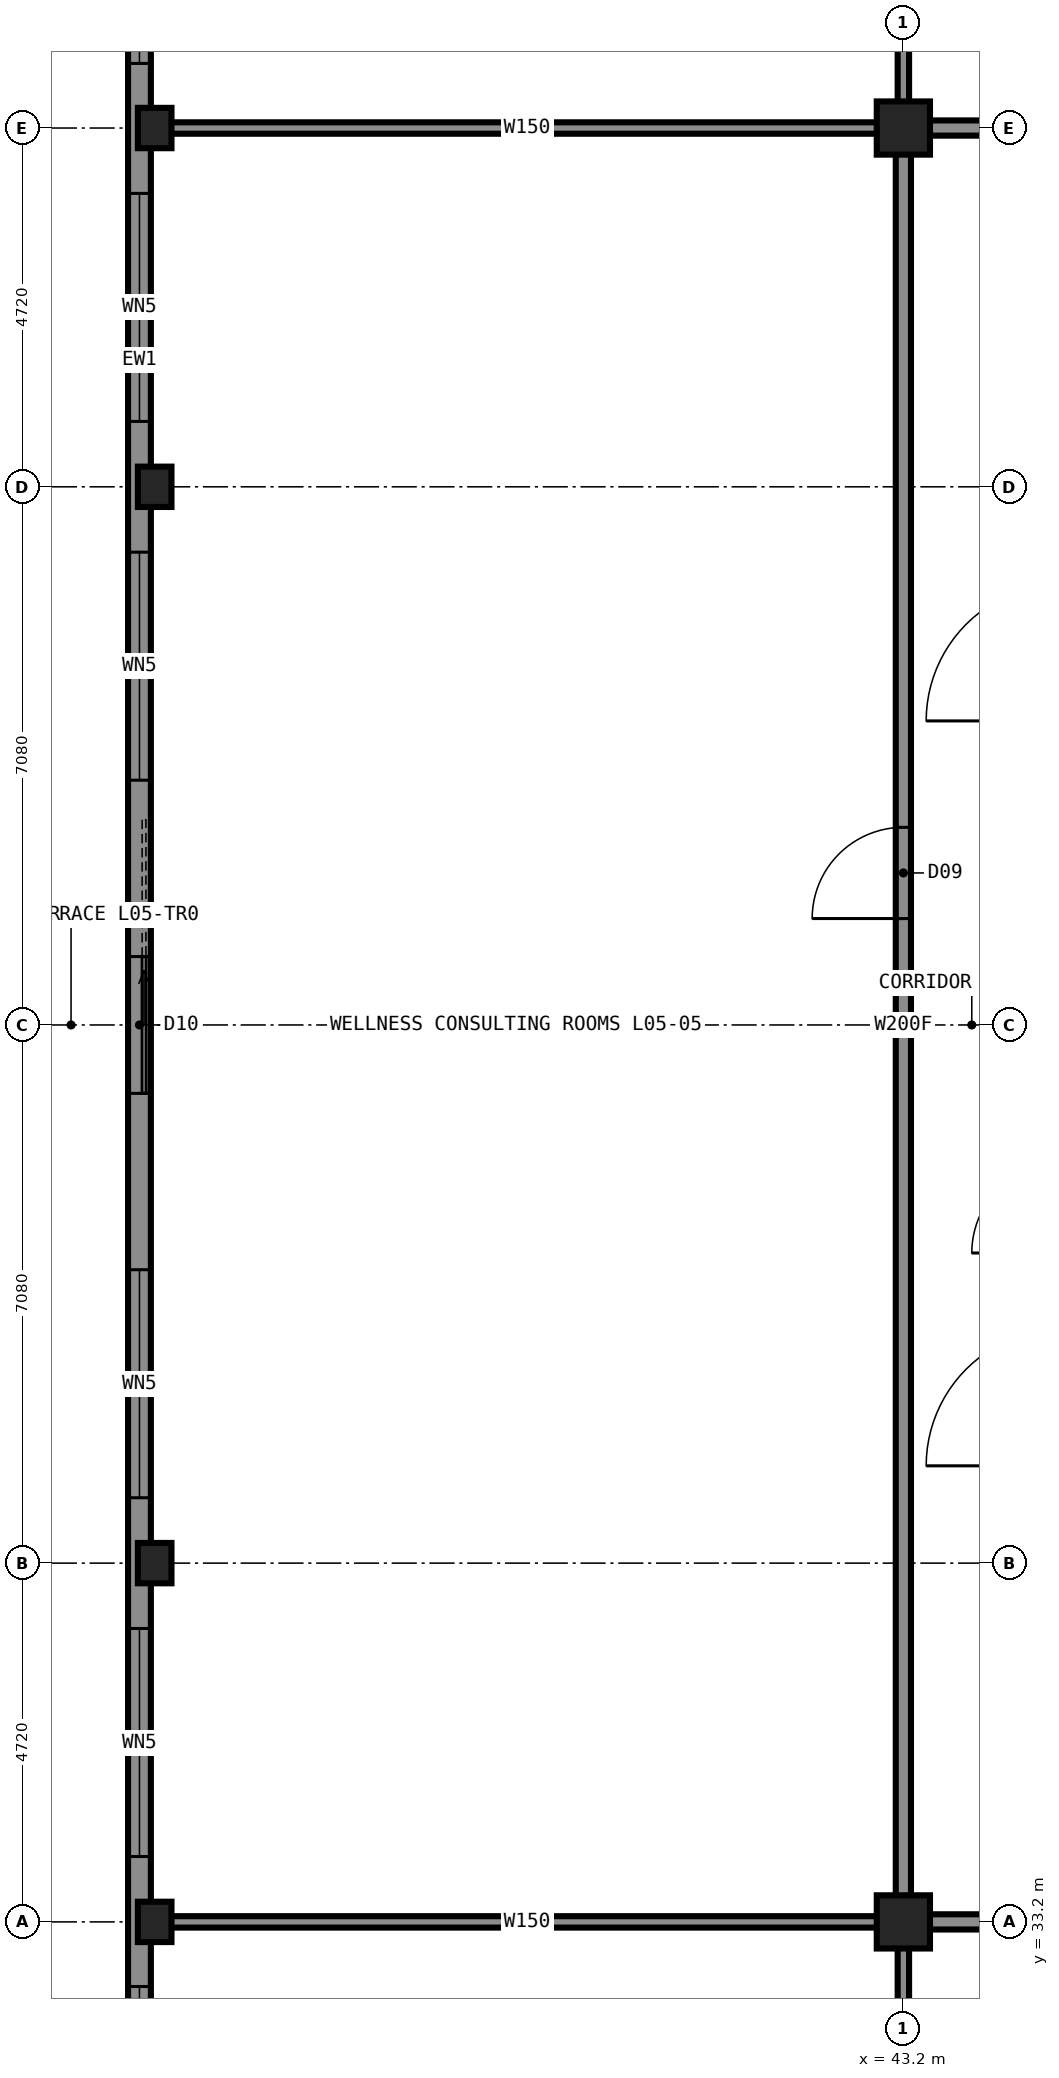
"""IFC4 building model, lengths in metres.
Left out: names, types, materials, properties, quantities, classifications, styles, units other than length and angle.
Written with IfcOpenShell. Run it as: python <this file> out.ifc"""

import sys

from ifc_helpers import new_model, si_unit, direction, frame, frame_2d, origin, origin_2d, place, context, subcontext, project, spatial, rectangle, hollow_rectangle, i_section, extrude, element, fill, save


model = new_model("IFC4")
c1 = context("Model", 3, precision=1e-05, world=origin(), true_north=direction((0.0, 1.0)))
c2 = subcontext(c1, "Body", "Model", "MODEL_VIEW")
j1 = project(units=[si_unit("LENGTHUNIT", "METRE"), si_unit("PLANEANGLEUNIT", "RADIAN")], contexts=[c1])
p1 = place(None, origin())
s1 = spatial("IfcSite", under=j1, at=p1, CompositionType="ELEMENT")
p2 = place(p1, origin())
s2 = spatial("IfcBuilding", under=s1, at=p2, CompositionType="ELEMENT")
p3 = place(p2, frame((0.0, 0.0, 25.0)))
s3 = spatial("IfcBuildingStorey", under=s2, at=p3, CompositionType="ELEMENT", Elevation=25.0)
for number, where, z_axis, x_axis in (
    (1, (33.35, 33.2, 0.0), (0.0, 0.0, 1.0), (1.0, 0.0, 0.0)),
    (2, (33.35, 37.92, 0.0), (0.0, 0.0, 1.0), (1.0, 0.0, 0.0)),
    (3, (33.35, 52.08, 0.0), (0.0, 0.0, 1.0), (1.0, 0.0, 0.0)),
    (4, (33.35, 56.8, 0.0), (0.0, 0.0, 1.0), (1.0, 0.0, 0.0)),
):
    element("IfcColumn", number, at=place(p3, frame(where, z_axis=z_axis, x_axis=x_axis)), inside=s3, PredefinedType="COLUMN", context=c2, shape_type="SweptSolid", body=[
        extrude(i_section(OverallWidth=0.442, OverallDepth=0.531, WebThickness=0.066, FlangeThickness=0.106, at=origin_2d()), origin(), (0.0, 0.0, 1.0), 3.5),
    ])
for number, where, z_axis, x_axis in (
    (5, (43.2, 33.2, 0.0), (0.0, 0.0, 1.0), (1.0, 0.0, 0.0)),
    (6, (43.2, 56.8, 0.0), (0.0, 0.0, 1.0), (1.0, 0.0, 0.0)),
):
    element("IfcColumn", number, at=place(p3, frame(where, z_axis=z_axis, x_axis=x_axis)), inside=s3, PredefinedType="COLUMN", context=c2, shape_type="SweptSolid", body=[
        extrude(hollow_rectangle(XDim=0.7, YDim=0.7, WallThickness=0.06, at=origin_2d()), origin(), (0.0, 0.0, 1.0), 3.5),
    ])
p4 = place(p3, frame((43.2, 33.2, 0.0), z_axis=(0.0, 0.0, 1.0), x_axis=(1.0, 0.0, 0.0)))
e7 = element("IfcWall", 7, at=p4, inside=s3, PredefinedType="PARTITIONING", context=c2, shape_type="SweptSolid", body=[
    extrude(rectangle(XDim=23.6, YDim=0.2, at=frame_2d((11.8, 0.0))), origin(), (0.0, 0.0, 1.0), 3.33),
])
p5 = place(p4, frame((4.9, 0.0, 0.0)))
e8 = element("IfcOpeningElement", 8, at=p5, cuts=e7, PredefinedType="OPENING", context=c2, shape_type="SweptSolid", body=[
    extrude(rectangle(XDim=1.8, YDim=2.2, at=frame_2d((0.9, 1.1))), frame((0.0, 0.11, 0.0), z_axis=(0.0, -1.0, 0.0), x_axis=(1.0, 0.0, 0.0)), (0.0, 0.0, 1.0), 0.22),
])
p6 = place(p3, frame((33.3, 33.2, 0.0), z_axis=(0.0, 0.0, 1.0), x_axis=(1.0, 0.0, 0.0)))
e9 = element("IfcWall", 9, at=p6, inside=s3, PredefinedType="PARTITIONING", context=c2, shape_type="SweptSolid", body=[
    extrude(rectangle(XDim=9.9, YDim=0.15, at=frame_2d((4.95, 0.0))), origin(), (0.0, 0.0, 1.0), 2.573),
])
p7 = place(p3, frame((43.2, 56.8, 0.0), z_axis=(0.0, 0.0, 1.0), x_axis=(1.0, 0.0, 0.0)))
e10 = element("IfcWall", 10, at=p7, inside=s3, PredefinedType="PARTITIONING", context=c2, shape_type="SweptSolid", body=[
    extrude(rectangle(XDim=23.6, YDim=0.2, at=frame_2d((11.8, 0.0))), origin(), (0.0, 0.0, 1.0), 3.33),
])
p8 = place(p7, frame((4.9, 0.0, 0.0)))
e11 = element("IfcOpeningElement", 11, at=p8, cuts=e10, PredefinedType="OPENING", context=c2, shape_type="SweptSolid", body=[
    extrude(rectangle(XDim=1.8, YDim=2.2, at=frame_2d((0.9, 1.1))), frame((0.0, 0.11, 0.0), z_axis=(0.0, -1.0, 0.0), x_axis=(1.0, 0.0, 0.0)), (0.0, 0.0, 1.0), 0.22),
])
p9 = place(p3, frame((33.3, 56.8, 0.0), z_axis=(0.0, 0.0, 1.0), x_axis=(1.0, 0.0, 0.0)))
e12 = element("IfcWall", 12, at=p9, inside=s3, PredefinedType="PARTITIONING", context=c2, shape_type="SweptSolid", body=[
    extrude(rectangle(XDim=9.9, YDim=0.15, at=frame_2d((4.95, 0.0))), origin(), (0.0, 0.0, 1.0), 2.573),
])
p10 = place(p3, frame((43.2, 33.2, 0.0), z_axis=(0.0, 0.0, 1.0), x_axis=(0.0, 1.0, 0.0)))
e13 = element("IfcWall", 13, at=p10, inside=s3, PredefinedType="PARTITIONING", context=c2, shape_type="SweptSolid", body=[
    extrude(rectangle(XDim=23.6, YDim=0.2, at=frame_2d((11.8, 0.0))), origin(), (0.0, 0.0, 1.0), 3.33),
])
p11 = place(p10, frame((13.2, 0.0, 0.0)))
e14 = element("IfcOpeningElement", 14, at=p11, cuts=e13, PredefinedType="OPENING", context=c2, shape_type="SweptSolid", body=[
    extrude(rectangle(XDim=1.2, YDim=2.2, at=frame_2d((0.6, 1.1))), frame((0.0, 0.11, 0.0), z_axis=(0.0, -1.0, 0.0), x_axis=(1.0, 0.0, 0.0)), (0.0, 0.0, 1.0), 0.22),
])
p12 = place(p3, frame((43.2, 23.3, 0.0), z_axis=(0.0, 0.0, 1.0), x_axis=(0.0, 1.0, 0.0)))
e15 = element("IfcWall", 15, at=p12, inside=s3, PredefinedType="PARTITIONING", context=c2, shape_type="SweptSolid", body=[
    extrude(rectangle(XDim=9.9, YDim=0.15, at=frame_2d((4.95, 0.0))), origin(), (0.0, 0.0, 1.0), 2.573),
])
p13 = place(p12, frame((5.1, 0.0, 0.0)))
e16 = element("IfcOpeningElement", 16, at=p13, cuts=e15, PredefinedType="OPENING", context=c2, shape_type="SweptSolid", body=[
    extrude(rectangle(XDim=1.2, YDim=2.2, at=frame_2d((0.6, 1.1))), frame((0.0, 0.085, 0.0), z_axis=(0.0, -1.0, 0.0), x_axis=(1.0, 0.0, 0.0)), (0.0, 0.0, 1.0), 0.17),
])
p14 = place(p3, frame((43.2, 56.8, 0.0), z_axis=(0.0, 0.0, 1.0), x_axis=(0.0, 1.0, 0.0)))
e17 = element("IfcWall", 17, at=p14, inside=s3, PredefinedType="PARTITIONING", context=c2, shape_type="SweptSolid", body=[
    extrude(rectangle(XDim=9.9, YDim=0.15, at=frame_2d((4.95, 0.0))), origin(), (0.0, 0.0, 1.0), 2.573),
])
p15 = place(p14, frame((3.6, 0.0, 0.0)))
e18 = element("IfcOpeningElement", 18, at=p15, cuts=e17, PredefinedType="OPENING", context=c2, shape_type="SweptSolid", body=[
    extrude(rectangle(XDim=1.2, YDim=2.2, at=frame_2d((0.6, 1.1))), frame((0.0, 0.085, 0.0), z_axis=(0.0, -1.0, 0.0), x_axis=(1.0, 0.0, 0.0)), (0.0, 0.0, 1.0), 0.17),
])
p16 = place(p3, frame((33.15, 61.5, 0.0), z_axis=(0.0, 0.0, 1.0), x_axis=(0.0, -1.0, 0.0)))
e19 = element("IfcWall", 19, at=p16, inside=s3, PredefinedType="SOLIDWALL", context=c2, shape_type="SweptSolid", body=[
    extrude(rectangle(XDim=33.0, YDim=0.3, at=frame_2d((16.5, 0.0))), origin(), (0.0, 0.0, 1.0), 2.83),
])
p17 = place(p16, frame((0.85, 0.0, 0.3)))
e20 = element("IfcOpeningElement", 20, at=p17, cuts=e19, PredefinedType="OPENING", context=c2, shape_type="SweptSolid", body=[
    extrude(rectangle(XDim=3.0, YDim=2.5, at=frame_2d((1.5, 1.25))), frame((0.0, 0.16, 0.0), z_axis=(0.0, -1.0, 0.0), x_axis=(1.0, 0.0, 0.0)), (0.0, 0.0, 1.0), 0.32),
])
p18 = place(p16, frame((5.56, 0.0, 0.3)))
e21 = element("IfcOpeningElement", 21, at=p18, cuts=e19, PredefinedType="OPENING", context=c2, shape_type="SweptSolid", body=[
    extrude(rectangle(XDim=3.0, YDim=2.5, at=frame_2d((1.5, 1.25))), frame((0.0, 0.16, 0.0), z_axis=(0.0, -1.0, 0.0), x_axis=(1.0, 0.0, 0.0)), (0.0, 0.0, 1.0), 0.32),
])
p19 = place(p16, frame((10.28, 0.0, 0.3)))
e22 = element("IfcOpeningElement", 22, at=p19, cuts=e19, PredefinedType="OPENING", context=c2, shape_type="SweptSolid", body=[
    extrude(rectangle(XDim=3.0, YDim=2.5, at=frame_2d((1.5, 1.25))), frame((0.0, 0.16, 0.0), z_axis=(0.0, -1.0, 0.0), x_axis=(1.0, 0.0, 0.0)), (0.0, 0.0, 1.0), 0.32),
])
p20 = place(p16, frame((15.6, 0.0, 0.0)))
e23 = element("IfcOpeningElement", 23, at=p20, cuts=e19, PredefinedType="OPENING", context=c2, shape_type="SweptSolid", body=[
    extrude(rectangle(XDim=1.8, YDim=2.4, at=frame_2d((0.9, 1.2))), frame((0.0, 0.16, 0.0), z_axis=(0.0, -1.0, 0.0), x_axis=(1.0, 0.0, 0.0)), (0.0, 0.0, 1.0), 0.32),
])
p21 = place(p16, frame((19.72, 0.0, 0.3)))
e24 = element("IfcOpeningElement", 24, at=p21, cuts=e19, PredefinedType="OPENING", context=c2, shape_type="SweptSolid", body=[
    extrude(rectangle(XDim=3.0, YDim=2.5, at=frame_2d((1.5, 1.25))), frame((0.0, 0.16, 0.0), z_axis=(0.0, -1.0, 0.0), x_axis=(1.0, 0.0, 0.0)), (0.0, 0.0, 1.0), 0.32),
])
p22 = place(p16, frame((24.44, 0.0, 0.3)))
e25 = element("IfcOpeningElement", 25, at=p22, cuts=e19, PredefinedType="OPENING", context=c2, shape_type="SweptSolid", body=[
    extrude(rectangle(XDim=3.0, YDim=2.5, at=frame_2d((1.5, 1.25))), frame((0.0, 0.16, 0.0), z_axis=(0.0, -1.0, 0.0), x_axis=(1.0, 0.0, 0.0)), (0.0, 0.0, 1.0), 0.32),
])
p23 = place(p16, frame((29.15, 0.0, 0.3)))
e26 = element("IfcOpeningElement", 26, at=p23, cuts=e19, PredefinedType="OPENING", context=c2, shape_type="SweptSolid", body=[
    extrude(rectangle(XDim=3.0, YDim=2.5, at=frame_2d((1.5, 1.25))), frame((0.0, 0.16, 0.0), z_axis=(0.0, -1.0, 0.0), x_axis=(1.0, 0.0, 0.0)), (0.0, 0.0, 1.0), 0.32),
])
p24 = place(p11, origin())
e27 = element("IfcDoor", 27, at=p24, inside=s3, OperationType="SINGLE_SWING_LEFT", PredefinedType="DOOR", context=c2, shape_type="SweptSolid", body=[
    extrude(rectangle(XDim=1.2, YDim=2.2, at=frame_2d((0.6, 1.1))), frame((0.0, 0.025, 0.0), z_axis=(0.0, -1.0, 0.0), x_axis=(1.0, 0.0, 0.0)), (0.0, 0.0, 1.0), 0.05),
])
fill(e14, e27)
p25 = place(p17, origin())
e28 = element("IfcWindow", 28, at=p25, inside=s3, PartitioningType="SINGLE_PANEL", PredefinedType="WINDOW", context=c2, shape_type="SweptSolid", body=[
    extrude(rectangle(XDim=3.0, YDim=2.5, at=frame_2d((1.5, 1.25))), frame((0.0, 0.03, 0.0), z_axis=(0.0, -1.0, 0.0), x_axis=(1.0, 0.0, 0.0)), (0.0, 0.0, 1.0), 0.06),
])
fill(e20, e28)
p26 = place(p18, origin())
e29 = element("IfcWindow", 29, at=p26, inside=s3, PartitioningType="SINGLE_PANEL", PredefinedType="WINDOW", context=c2, shape_type="SweptSolid", body=[
    extrude(rectangle(XDim=3.0, YDim=2.5, at=frame_2d((1.5, 1.25))), frame((0.0, 0.03, 0.0), z_axis=(0.0, -1.0, 0.0), x_axis=(1.0, 0.0, 0.0)), (0.0, 0.0, 1.0), 0.06),
])
fill(e21, e29)
p27 = place(p19, origin())
e30 = element("IfcWindow", 30, at=p27, inside=s3, PartitioningType="SINGLE_PANEL", PredefinedType="WINDOW", context=c2, shape_type="SweptSolid", body=[
    extrude(rectangle(XDim=3.0, YDim=2.5, at=frame_2d((1.5, 1.25))), frame((0.0, 0.03, 0.0), z_axis=(0.0, -1.0, 0.0), x_axis=(1.0, 0.0, 0.0)), (0.0, 0.0, 1.0), 0.06),
])
fill(e22, e30)
p28 = place(p20, origin())
e31 = element("IfcDoor", 31, at=p28, inside=s3, OperationType="SLIDING_TO_LEFT", PredefinedType="DOOR", context=c2, shape_type="SweptSolid", body=[
    extrude(rectangle(XDim=1.8, YDim=2.4, at=frame_2d((0.9, 1.2))), frame((0.0, 0.025, 0.0), z_axis=(0.0, -1.0, 0.0), x_axis=(1.0, 0.0, 0.0)), (0.0, 0.0, 1.0), 0.05),
])
fill(e23, e31)
p29 = place(p21, origin())
e32 = element("IfcWindow", 32, at=p29, inside=s3, PartitioningType="SINGLE_PANEL", PredefinedType="WINDOW", context=c2, shape_type="SweptSolid", body=[
    extrude(rectangle(XDim=3.0, YDim=2.5, at=frame_2d((1.5, 1.25))), frame((0.0, 0.03, 0.0), z_axis=(0.0, -1.0, 0.0), x_axis=(1.0, 0.0, 0.0)), (0.0, 0.0, 1.0), 0.06),
])
fill(e24, e32)
p30 = place(p22, origin())
e33 = element("IfcWindow", 33, at=p30, inside=s3, PartitioningType="SINGLE_PANEL", PredefinedType="WINDOW", context=c2, shape_type="SweptSolid", body=[
    extrude(rectangle(XDim=3.0, YDim=2.5, at=frame_2d((1.5, 1.25))), frame((0.0, 0.03, 0.0), z_axis=(0.0, -1.0, 0.0), x_axis=(1.0, 0.0, 0.0)), (0.0, 0.0, 1.0), 0.06),
])
fill(e25, e33)
p31 = place(p23, origin())
e34 = element("IfcWindow", 34, at=p31, inside=s3, PartitioningType="SINGLE_PANEL", PredefinedType="WINDOW", context=c2, shape_type="SweptSolid", body=[
    extrude(rectangle(XDim=3.0, YDim=2.5, at=frame_2d((1.5, 1.25))), frame((0.0, 0.03, 0.0), z_axis=(0.0, -1.0, 0.0), x_axis=(1.0, 0.0, 0.0)), (0.0, 0.0, 1.0), 0.06),
])
fill(e26, e34)
save(model, sys.argv[1])
